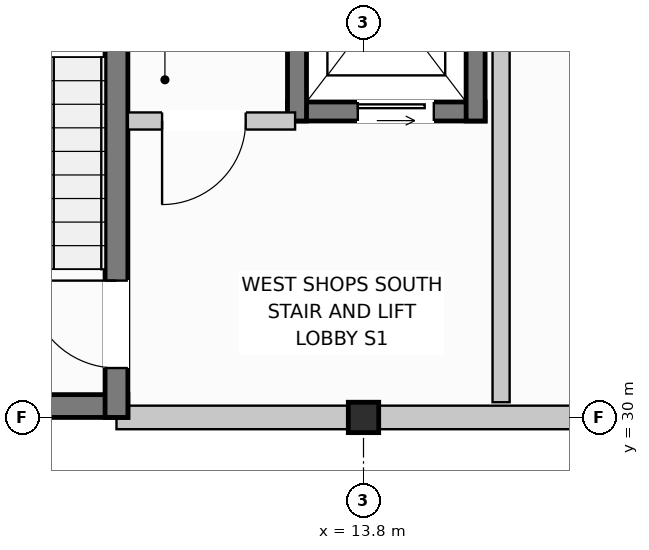
"""IFC4 building model, lengths in metres.
Left out: names, types, materials, properties, quantities, classifications, styles, units other than length and angle.
Written with IfcOpenShell. Run it as: python <this file> out.ifc"""

import sys

from ifc_helpers import new_model, si_unit, direction, frame, frame_2d, origin, origin_with_axes, origin_2d, place, context, subcontext, project, spatial, rectangle, extrude, element, fill, save


model = new_model("IFC4")
c1 = context("Model", 3, precision=1e-05, world=origin(), true_north=direction((0.0, 1.0)))
c2 = subcontext(c1, "Body", "Model", "MODEL_VIEW")
j1 = project(units=[si_unit("LENGTHUNIT", "METRE"), si_unit("PLANEANGLEUNIT", "RADIAN")], contexts=[c1])
p1 = place(None, origin())
s1 = spatial("IfcSite", under=j1, at=p1, CompositionType="ELEMENT")
p2 = place(p1, origin())
s2 = spatial("IfcBuilding", under=s1, at=p2, CompositionType="ELEMENT")
p3 = place(p2, frame((0.0, 0.0, 4.4)))
s3 = spatial("IfcBuildingStorey", under=s2, at=p3, CompositionType="ELEMENT", Elevation=4.4)
p4 = place(p3, frame((13.8, 30.0, 0.0), z_axis=(0.0, 0.0, 1.0), x_axis=(1.0, 0.0, 0.0)))
e1 = element("IfcColumn", 1, at=p4, inside=s3, PredefinedType="COLUMN", context=c2, shape_type="SweptSolid", body=[
    extrude(rectangle(XDim=0.4, YDim=0.4, at=origin_2d()), origin(), (0.0, 0.0, 1.0), 3.6),
])
p5 = place(p3, frame((10.55, 30.0, 0.0), z_axis=(0.0, 0.0, 1.0), x_axis=(1.0, 0.0, 0.0)))
e2 = element("IfcWall", 2, at=p5, inside=s3, PredefinedType="STANDARD", context=c2, shape_type="SweptSolid", body=[
    extrude(rectangle(XDim=10.15, YDim=0.31, at=frame_2d((5.075, 0.0))), origin(), (0.0, 0.0, 1.0), 2.96),
])
p6 = place(p5, frame((6.5, 0.0, 0.9)))
e3 = element("IfcOpeningElement", 3, at=p6, cuts=e2, PredefinedType="OPENING", context=c2, shape_type="SweptSolid", body=[
    extrude(rectangle(XDim=2.2, YDim=1.35, at=frame_2d((1.1, 0.675))), frame((0.0, 0.167, 0.0), z_axis=(0.0, -1.0, 0.0), x_axis=(1.0, 0.0, 0.0)), (0.0, 0.0, 1.0), 0.334),
])
p7 = place(p3, frame((7.2, 30.15, 0.0), z_axis=(0.0, 0.0, 1.0), x_axis=(1.0, 0.0, 0.0)))
e4 = element("IfcWall", 4, at=p7, inside=s3, PredefinedType="SHEAR", context=c2, shape_type="SweptSolid", body=[
    extrude(rectangle(XDim=3.5, YDim=0.3, at=frame_2d((1.75, 0.0))), origin(), (0.0, 0.0, 1.0), 3.33),
])
p8 = place(p3, frame((10.55, 30.0, 0.0), z_axis=(0.0, 0.0, 1.0), x_axis=(0.0, 1.0, 0.0)))
e5 = element("IfcWall", 5, at=p8, inside=s3, PredefinedType="SHEAR", context=c2, shape_type="SweptSolid", body=[
    extrude(rectangle(XDim=7.5, YDim=0.3, at=frame_2d((3.75, 0.0))), origin(), (0.0, 0.0, 1.0), 3.33),
])
p9 = place(p8, frame((0.65, 0.0, 0.0)))
e6 = element("IfcOpeningElement", 6, at=p9, cuts=e5, PredefinedType="OPENING", context=c2, shape_type="SweptSolid", body=[
    extrude(rectangle(XDim=1.15, YDim=2.15, at=frame_2d((0.575, 1.075))), frame((0.0, 0.162, 0.0), z_axis=(0.0, -1.0, 0.0), x_axis=(1.0, 0.0, 0.0)), (0.0, 0.0, 1.0), 0.324),
])
p10 = place(p3, frame((12.8, 34.025, 0.0), z_axis=(0.0, 0.0, 1.0), x_axis=(1.0, 0.0, 0.0)))
e7 = element("IfcWall", 7, at=p10, inside=s3, PredefinedType="SHEAR", context=c2, shape_type="SweptSolid", body=[
    extrude(rectangle(XDim=2.6, YDim=0.25, at=frame_2d((1.3, 0.0))), origin(), (0.0, 0.0, 1.0), 3.33),
])
p11 = place(p10, frame((0.925, 0.0, 0.0)))
e8 = element("IfcOpeningElement", 8, at=p11, cuts=e7, PredefinedType="OPENING", context=c2, shape_type="SweptSolid", body=[
    extrude(rectangle(XDim=1.0, YDim=2.1, at=frame_2d((0.5, 1.05))), frame((0.0, 0.137, 0.0), z_axis=(0.0, -1.0, 0.0), x_axis=(1.0, 0.0, 0.0)), (0.0, 0.0, 1.0), 0.274),
])
for number, where, z_axis, x_axis in (
    (9, (12.925, 33.9, 0.0), (0.0, 0.0, 1.0), (0.0, 1.0, 0.0)),
    (10, (15.275, 33.9, 0.0), (0.0, 0.0, 1.0), (0.0, 1.0, 0.0)),
):
    element("IfcWall", number, at=place(p3, frame(where, z_axis=z_axis, x_axis=x_axis)), inside=s3, PredefinedType="SHEAR", context=c2, shape_type="SweptSolid", body=[
        extrude(rectangle(XDim=3.25, YDim=0.25, at=frame_2d((1.625, 0.0))), origin(), (0.0, 0.0, 1.0), 3.33),
    ])
p12 = place(p3, frame((15.61, 30.2, 0.0), z_axis=(0.0, 0.0, 1.0), x_axis=(0.0, 1.0, 0.0)))
e11 = element("IfcWall", 11, at=p12, inside=s3, PredefinedType="PARTITIONING", context=c2, shape_type="SweptSolid", body=[
    extrude(rectangle(XDim=7.6, YDim=0.225, at=frame_2d((3.8, 0.0))), origin(), (0.0, 0.0, 1.0), 3.33),
])
p13 = place(p3, frame((10.7, 33.9, 0.0), z_axis=(0.0, 0.0, 1.0), x_axis=(1.0, 0.0, 0.0)))
e12 = element("IfcWall", 12, at=p13, inside=s3, PredefinedType="PARTITIONING", context=c2, shape_type="SweptSolid", body=[
    extrude(rectangle(XDim=2.2, YDim=0.225, at=frame_2d((1.1, 0.0))), origin(), (0.0, 0.0, 1.0), 3.33),
])
p14 = place(p13, frame((0.45, 0.0, 0.0)))
e13 = element("IfcOpeningElement", 13, at=p14, cuts=e12, PredefinedType="OPENING", context=c2, shape_type="SweptSolid", body=[
    extrude(rectangle(XDim=1.1, YDim=2.15, at=frame_2d((0.55, 1.075))), frame((0.0, 0.125, 0.0), z_axis=(0.0, -1.0, 0.0), x_axis=(1.0, 0.0, 0.0)), (0.0, 0.0, 1.0), 0.249),
])
p15 = place(p9, origin_with_axes())
e14 = element("IfcDoor", 14, at=p15, inside=s3, OperationType="SINGLE_SWING_RIGHT", PredefinedType="DOOR", context=c2, shape_type="SweptSolid", body=[
    extrude(rectangle(XDim=1.15, YDim=2.15, at=frame_2d((0.575, 1.075))), frame((0.0, 0.025, 0.0), z_axis=(0.0, -1.0, 0.0), x_axis=(1.0, 0.0, 0.0)), (0.0, 0.0, 1.0), 0.05),
])
fill(e6, e14)
p16 = place(p11, origin_with_axes())
e15 = element("IfcDoor", 15, at=p16, inside=s3, OperationType="SLIDING_TO_LEFT", PredefinedType="DOOR", context=c2, shape_type="SweptSolid", body=[
    extrude(rectangle(XDim=1.0, YDim=2.1, at=frame_2d((0.5, 1.05))), frame((0.0, 0.025, 0.0), z_axis=(0.0, -1.0, 0.0), x_axis=(1.0, 0.0, 0.0)), (0.0, 0.0, 1.0), 0.05),
])
fill(e8, e15)
p17 = place(p14, frame((1.1, 0.0, 0.0), z_axis=(0.0, 0.0, 1.0), x_axis=(-1.0, 0.0, 0.0)))
e16 = element("IfcDoor", 16, at=p17, inside=s3, OperationType="SINGLE_SWING_LEFT", PredefinedType="DOOR", context=c2, shape_type="SweptSolid", body=[
    extrude(rectangle(XDim=1.1, YDim=2.15, at=frame_2d((0.55, 1.075))), frame((0.0, 0.025, 0.0), z_axis=(0.0, -1.0, 0.0), x_axis=(1.0, 0.0, 0.0)), (0.0, 0.0, 1.0), 0.05),
])
fill(e13, e16)
save(model, sys.argv[1])
